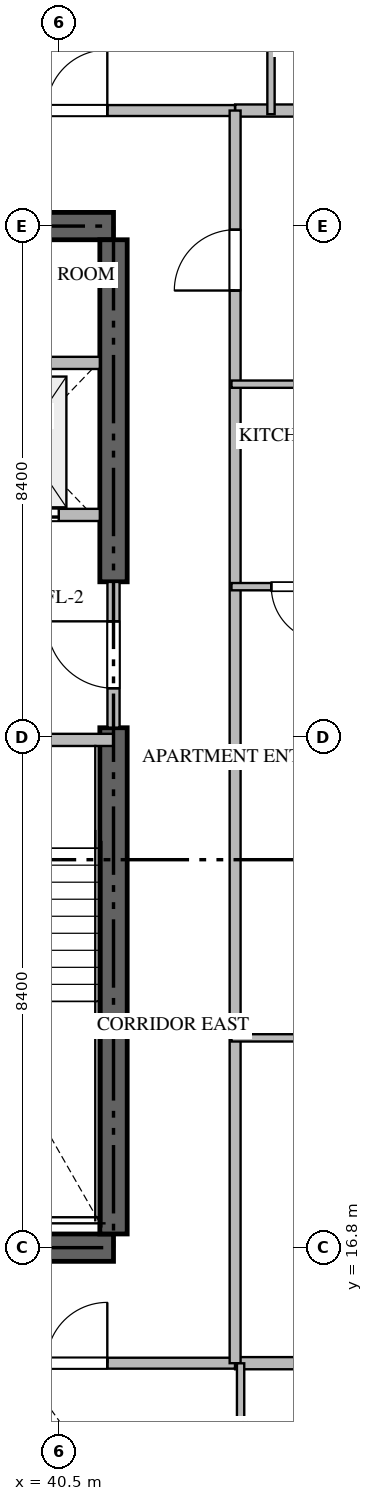
"""IFC4 building model, lengths in metres.
Left out: names, types, materials, properties, quantities, classifications, styles, units other than length and angle.
Written with IfcOpenShell. Run it as: python <this file> out.ifc"""

import sys

from ifc_helpers import new_model, si_unit, direction, frame, frame_2d, origin, place, context, subcontext, project, spatial, rectangle, extrude, source, transform, mapped, element, fill, save


model = new_model("IFC4")
c1 = context("Model", 3, precision=1e-05, world=origin(), true_north=direction((0.0, 1.0)))
c2 = subcontext(c1, "Body", "Model", "MODEL_VIEW")
j1 = project(units=[si_unit("LENGTHUNIT", "METRE"), si_unit("PLANEANGLEUNIT", "RADIAN")], contexts=[c1])
p1 = place(None, origin())
s1 = spatial("IfcSite", under=j1, at=p1, CompositionType="ELEMENT")
p2 = place(p1, origin())
s2 = spatial("IfcBuilding", under=s1, at=p2, CompositionType="ELEMENT")
p3 = place(p2, frame((0.0, 0.0, 45.45)))
s3 = spatial("IfcBuildingStorey", under=s2, at=p3, CompositionType="ELEMENT", Elevation=45.45)
for number, where, z_axis, x_axis in (
    (1, (23.4, 16.8, -0.26), (0.0, 0.0, 1.0), (1.0, 0.0, 0.0)),
    (2, (41.4, 33.6, -0.26), (0.0, 0.0, 1.0), (-1.0, 0.0, 0.0)),
):
    element("IfcWall", number, at=place(p3, frame(where, z_axis=z_axis, x_axis=x_axis)), inside=s3, PredefinedType="SHEAR", context=c2, shape_type="SweptSolid", body=[
        extrude(rectangle(XDim=18.0, YDim=0.45, at=frame_2d((9.0, 0.0))), origin(), (0.0, 0.0, 1.0), 3.748),
    ])
p4 = place(p3, frame((41.4, 17.025, -0.26), z_axis=(0.0, 0.0, 1.0), x_axis=(0.0, 1.0, 0.0)))
e3 = element("IfcWall", 3, at=p4, inside=s3, PredefinedType="SHEAR", context=c2, shape_type="SweptSolid", body=[
    extrude(rectangle(XDim=8.325, YDim=0.45, at=frame_2d((4.163, 0.0))), origin(), (0.0, 0.0, 1.0), 3.748),
])
p5 = place(p3, frame((41.4, 27.75, -0.26), z_axis=(0.0, 0.0, 1.0), x_axis=(0.0, 1.0, 0.0)))
e4 = element("IfcWall", 4, at=p5, inside=s3, PredefinedType="SHEAR", context=c2, shape_type="SweptSolid", body=[
    extrude(rectangle(XDim=5.625, YDim=0.45, at=frame_2d((2.812, 0.0))), origin(), (0.0, 0.0, 1.0), 3.748),
])
p6 = place(p3, frame((36.95, 25.15, 0.0), z_axis=(0.0, 0.0, 1.0), x_axis=(1.0, 0.0, 0.0)))
e5 = element("IfcWall", 5, at=p6, inside=s3, PredefinedType="STANDARD", context=c2, shape_type="SweptSolid", body=[
    extrude(rectangle(XDim=4.45, YDim=0.2, at=frame_2d((2.225, 0.0))), origin(), (0.0, 0.0, 1.0), 3.49),
])
p7 = place(p6, frame((1.65, 0.0, 0.0)))
e6 = element("IfcOpeningElement", 6, at=p7, cuts=e5, PredefinedType="OPENING", context=c2, shape_type="SweptSolid", body=[
    extrude(rectangle(XDim=1.1, YDim=2.15, at=frame_2d((0.55, 1.075))), frame((0.0, 0.11, 0.0), z_axis=(0.0, -1.0, 0.0), x_axis=(1.0, 0.0, 0.0)), (0.0, 0.0, 1.0), 0.22),
])
p8 = place(p3, frame((38.75, 28.85, 0.0), z_axis=(0.0, 0.0, 1.0), x_axis=(1.0, 0.0, 0.0)))
e7 = element("IfcWall", 7, at=p8, inside=s3, PredefinedType="STANDARD", context=c2, shape_type="SweptSolid", body=[
    extrude(rectangle(XDim=2.425, YDim=0.2, at=frame_2d((1.212, 0.0))), origin(), (0.0, 0.0, 1.0), 3.49),
])
p9 = place(p8, frame((0.55, 0.0, 0.0)))
e8 = element("IfcOpeningElement", 8, at=p9, cuts=e7, PredefinedType="OPENING", context=c2, shape_type="SweptSolid", body=[
    extrude(rectangle(XDim=1.2, YDim=2.2, at=frame_2d((0.6, 1.1))), frame((0.0, 0.11, 0.0), z_axis=(0.0, -1.0, 0.0), x_axis=(1.0, 0.0, 0.0)), (0.0, 0.0, 1.0), 0.22),
])
p10 = place(p3, frame((38.75, 31.35, 0.0), z_axis=(0.0, 0.0, 1.0), x_axis=(1.0, 0.0, 0.0)))
e9 = element("IfcWall", 9, at=p10, inside=s3, PredefinedType="STANDARD", context=c2, shape_type="SweptSolid", body=[
    extrude(rectangle(XDim=2.425, YDim=0.2, at=frame_2d((1.212, 0.0))), origin(), (0.0, 0.0, 1.0), 3.49),
])
p11 = place(p3, frame((41.4, 25.352, 0.0), z_axis=(0.0, 0.0, 1.0), x_axis=(0.0, 1.0, 0.0)))
e10 = element("IfcWall", 10, at=p11, inside=s3, PredefinedType="STANDARD", context=c2, shape_type="SweptSolid", body=[
    extrude(rectangle(XDim=2.396, YDim=0.2, at=frame_2d((1.198, 0.0))), origin(), (0.0, 0.0, 1.0), 3.49),
])
p12 = place(p11, frame((0.648, 0.0, 0.0)))
e11 = element("IfcOpeningElement", 11, at=p12, cuts=e10, PredefinedType="OPENING", context=c2, shape_type="SweptSolid", body=[
    extrude(rectangle(XDim=1.1, YDim=2.15, at=frame_2d((0.55, 1.075))), frame((0.0, 0.11, 0.0), z_axis=(0.0, -1.0, 0.0), x_axis=(1.0, 0.0, 0.0)), (0.0, 0.0, 1.0), 0.22),
])
for number, where, z_axis, x_axis in (
    (12, (43.4, 14.9, 0.0), (0.0, 0.0, 1.0), (1.0, 0.0, 0.0)),
    (13, (43.4, 35.5, 0.0), (0.0, 0.0, 1.0), (1.0, 0.0, 0.0)),
):
    element("IfcWall", number, at=place(p3, frame(where, z_axis=z_axis, x_axis=x_axis)), inside=s3, PredefinedType="PARTITIONING", context=c2, shape_type="SweptSolid", body=[
        extrude(rectangle(XDim=15.318, YDim=0.2, at=frame_2d((7.659, 0.0))), origin(), (0.0, 0.0, 1.0), 3.49),
    ])
p13 = place(p3, frame((21.402, 14.9, 0.0), z_axis=(0.0, 0.0, 1.0), x_axis=(1.0, 0.0, 0.0)))
e14 = element("IfcWall", 14, at=p13, inside=s3, PredefinedType="PARTITIONING", context=c2, shape_type="SweptSolid", body=[
    extrude(rectangle(XDim=21.996, YDim=0.18, at=frame_2d((10.998, 0.0))), origin(), (0.0, 0.0, 1.0), 3.49),
])
p14 = place(p13, frame((2.1, 0.0, 0.0)))
e15 = element("IfcOpeningElement", 15, at=p14, cuts=e14, PredefinedType="OPENING", context=c2, shape_type="SweptSolid", body=[
    extrude(rectangle(XDim=1.0, YDim=2.15, at=frame_2d((0.5, 1.075))), frame((0.0, 0.1, 0.0), z_axis=(0.0, -1.0, 0.0), x_axis=(1.0, 0.0, 0.0)), (0.0, 0.0, 1.0), 0.2),
])
p15 = place(p13, frame((14.319, 0.0, 0.0)))
e16 = element("IfcOpeningElement", 16, at=p15, cuts=e14, PredefinedType="OPENING", context=c2, shape_type="SweptSolid", body=[
    extrude(rectangle(XDim=1.0, YDim=2.15, at=frame_2d((0.5, 1.075))), frame((0.0, 0.1, 0.0), z_axis=(0.0, -1.0, 0.0), x_axis=(1.0, 0.0, 0.0)), (0.0, 0.0, 1.0), 0.2),
])
p16 = place(p13, frame((18.896, 0.0, 0.0)))
e17 = element("IfcOpeningElement", 17, at=p16, cuts=e14, PredefinedType="OPENING", context=c2, shape_type="SweptSolid", body=[
    extrude(rectangle(XDim=1.0, YDim=2.15, at=frame_2d((0.5, 1.075))), frame((0.0, 0.1, 0.0), z_axis=(0.0, -1.0, 0.0), x_axis=(1.0, 0.0, 0.0)), (0.0, 0.0, 1.0), 0.2),
])
p17 = place(p3, frame((21.402, 35.5, 0.0), z_axis=(0.0, 0.0, 1.0), x_axis=(1.0, 0.0, 0.0)))
e18 = element("IfcWall", 18, at=p17, inside=s3, PredefinedType="PARTITIONING", context=c2, shape_type="SweptSolid", body=[
    extrude(rectangle(XDim=21.996, YDim=0.18, at=frame_2d((10.998, 0.0))), origin(), (0.0, 0.0, 1.0), 3.49),
])
p18 = place(p17, frame((2.1, 0.0, 0.0)))
e19 = element("IfcOpeningElement", 19, at=p18, cuts=e18, PredefinedType="OPENING", context=c2, shape_type="SweptSolid", body=[
    extrude(rectangle(XDim=1.0, YDim=2.15, at=frame_2d((0.5, 1.075))), frame((0.0, 0.1, 0.0), z_axis=(0.0, -1.0, 0.0), x_axis=(1.0, 0.0, 0.0)), (0.0, 0.0, 1.0), 0.2),
])
p19 = place(p17, frame((5.333, 0.0, 0.0)))
e20 = element("IfcOpeningElement", 20, at=p19, cuts=e18, PredefinedType="OPENING", context=c2, shape_type="SweptSolid", body=[
    extrude(rectangle(XDim=1.0, YDim=2.15, at=frame_2d((0.5, 1.075))), frame((0.0, 0.1, 0.0), z_axis=(0.0, -1.0, 0.0), x_axis=(1.0, 0.0, 0.0)), (0.0, 0.0, 1.0), 0.2),
])
p20 = place(p17, frame((11.842, 0.0, 0.0)))
e21 = element("IfcOpeningElement", 21, at=p20, cuts=e18, PredefinedType="OPENING", context=c2, shape_type="SweptSolid", body=[
    extrude(rectangle(XDim=1.0, YDim=2.15, at=frame_2d((0.5, 1.075))), frame((0.0, 0.1, 0.0), z_axis=(0.0, -1.0, 0.0), x_axis=(1.0, 0.0, 0.0)), (0.0, 0.0, 1.0), 0.2),
])
p21 = place(p17, frame((18.896, 0.0, 0.0)))
e22 = element("IfcOpeningElement", 22, at=p21, cuts=e18, PredefinedType="OPENING", context=c2, shape_type="SweptSolid", body=[
    extrude(rectangle(XDim=1.0, YDim=2.15, at=frame_2d((0.5, 1.075))), frame((0.0, 0.1, 0.0), z_axis=(0.0, -1.0, 0.0), x_axis=(1.0, 0.0, 0.0)), (0.0, 0.0, 1.0), 0.2),
])
p22 = place(p3, frame((43.4, 14.9, 0.0), z_axis=(0.0, 0.0, 1.0), x_axis=(0.0, 1.0, 0.0)))
e23 = element("IfcWall", 23, at=p22, inside=s3, PredefinedType="PARTITIONING", context=c2, shape_type="SweptSolid", body=[
    extrude(rectangle(XDim=20.6, YDim=0.18, at=frame_2d((10.3, 0.0))), origin(), (0.0, 0.0, 1.0), 3.49),
])
p23 = place(p22, frame((17.64, 0.0, 0.0)))
e24 = element("IfcOpeningElement", 24, at=p23, cuts=e23, PredefinedType="OPENING", context=c2, shape_type="SweptSolid", body=[
    extrude(rectangle(XDim=1.0, YDim=2.15, at=frame_2d((0.5, 1.075))), frame((0.0, 0.1, 0.0), z_axis=(0.0, -1.0, 0.0), x_axis=(1.0, 0.0, 0.0)), (0.0, 0.0, 1.0), 0.2),
])
p24 = place(p3, frame((43.49, 12.15, 0.0), z_axis=(0.0, 0.0, 1.0), x_axis=(0.0, 1.0, 0.0)))
e25 = element("IfcWall", 25, at=p24, inside=s3, PredefinedType="PARTITIONING", context=c2, shape_type="SweptSolid", body=[
    extrude(rectangle(XDim=2.748, YDim=0.12, at=frame_2d((1.374, 0.0))), origin(), (0.0, 0.0, 1.0), 3.49),
])
p25 = place(p3, frame((43.99, 38.25, 0.0), z_axis=(0.0, 0.0, 1.0), x_axis=(0.0, -1.0, 0.0)))
e26 = element("IfcWall", 26, at=p25, inside=s3, PredefinedType="PARTITIONING", context=c2, shape_type="SweptSolid", body=[
    extrude(rectangle(XDim=2.81, YDim=0.12, at=frame_2d((1.405, 0.0))), origin(), (0.0, 0.0, 1.0), 3.49),
])
p26 = place(p3, frame((46.15, 31.0, 0.0), z_axis=(0.0, 0.0, 1.0), x_axis=(-1.0, 0.0, 0.0)))
e27 = element("IfcWall", 27, at=p26, inside=s3, PredefinedType="PARTITIONING", context=c2, shape_type="SweptSolid", body=[
    extrude(rectangle(XDim=2.81, YDim=0.12, at=frame_2d((1.405, 0.0))), origin(), (0.0, 0.0, 1.0), 3.49),
])
p27 = place(p3, frame((45.55, 27.67, 0.0), z_axis=(0.0, 0.0, 1.0), x_axis=(-1.0, 0.0, 0.0)))
e28 = element("IfcWall", 28, at=p27, inside=s3, PredefinedType="PARTITIONING", context=c2, shape_type="SweptSolid", body=[
    extrude(rectangle(XDim=2.21, YDim=0.12, at=frame_2d((1.105, 0.0))), origin(), (0.0, 0.0, 1.0), 3.49),
])
p28 = place(p27, frame((0.655, 0.0, 0.0)))
e29 = element("IfcOpeningElement", 29, at=p28, cuts=e28, PredefinedType="OPENING", context=c2, shape_type="SweptSolid", body=[
    extrude(rectangle(XDim=0.9, YDim=2.1, at=frame_2d((0.45, 1.05))), frame((0.0, 0.07, 0.0), z_axis=(0.0, -1.0, 0.0), x_axis=(1.0, 0.0, 0.0)), (0.0, 0.0, 1.0), 0.14),
])
p29 = place(p3, frame((45.548, 20.25, 0.0), z_axis=(0.0, 0.0, 1.0), x_axis=(-1.0, 0.0, 0.0)))
e30 = element("IfcWall", 30, at=p29, inside=s3, PredefinedType="PARTITIONING", context=c2, shape_type="SweptSolid", body=[
    extrude(rectangle(XDim=2.208, YDim=0.12, at=frame_2d((1.104, 0.0))), origin(), (0.0, 0.0, 1.0), 3.49),
])
m1 = source(origin(), c2, "Body", "SweptSolid", [
    extrude(rectangle(XDim=1.2, YDim=2.2, at=frame_2d((0.6, 1.1))), frame((0.0, 0.025, 0.0), z_axis=(0.0, -1.0, 0.0), x_axis=(1.0, 0.0, 0.0)), (0.0, 0.0, 1.0), 0.05),
])
p30 = place(p9, origin())
e31 = element("IfcDoor", 31, at=p30, inside=s3, OperationType="DOUBLE_DOOR_SLIDING", PredefinedType="DOOR", context=c2, shape_type="MappedRepresentation", body=[
    mapped(m1, transform((0.0, 0.0, 0.0), scale=1.0)),
])
fill(e8, e31)
m2 = source(origin(), c2, "Body", "SweptSolid", [
    extrude(rectangle(XDim=1.1, YDim=2.15, at=frame_2d((0.55, 1.075))), frame((0.0, 0.025, 0.0), z_axis=(0.0, -1.0, 0.0), x_axis=(1.0, 0.0, 0.0)), (0.0, 0.0, 1.0), 0.05),
])
p31 = place(p12, origin())
e32 = element("IfcDoor", 32, at=p31, inside=s3, OperationType="SINGLE_SWING_RIGHT", PredefinedType="DOOR", context=c2, shape_type="MappedRepresentation", body=[
    mapped(m2, transform((0.0, 0.0, 0.0), scale=1.0)),
])
fill(e11, e32)
m3 = source(origin(), c2, "Body", "SweptSolid", [
    extrude(rectangle(XDim=1.0, YDim=2.15, at=frame_2d((0.5, 1.075))), frame((0.0, 0.025, 0.0), z_axis=(0.0, -1.0, 0.0), x_axis=(1.0, 0.0, 0.0)), (0.0, 0.0, 1.0), 0.05),
])
p32 = place(p16, origin())
e33 = element("IfcDoor", 33, at=p32, inside=s3, OperationType="SINGLE_SWING_RIGHT", PredefinedType="DOOR", context=c2, shape_type="MappedRepresentation", body=[
    mapped(m3, transform((0.0, 0.0, 0.0), scale=1.0)),
])
fill(e17, e33)
p33 = place(p21, origin())
e34 = element("IfcDoor", 34, at=p33, inside=s3, OperationType="SINGLE_SWING_RIGHT", PredefinedType="DOOR", context=c2, shape_type="MappedRepresentation", body=[
    mapped(m3, transform((0.0, 0.0, 0.0), scale=1.0)),
])
fill(e22, e34)
p34 = place(p23, origin())
e35 = element("IfcDoor", 35, at=p34, inside=s3, OperationType="SINGLE_SWING_LEFT", PredefinedType="DOOR", context=c2, shape_type="MappedRepresentation", body=[
    mapped(m3, transform((0.0, 0.0, 0.0), scale=1.0)),
])
fill(e24, e35)
m4 = source(origin(), c2, "Body", "SweptSolid", [
    extrude(rectangle(XDim=0.9, YDim=2.1, at=frame_2d((0.45, 1.05))), frame((0.0, 0.025, 0.0), z_axis=(0.0, -1.0, 0.0), x_axis=(1.0, 0.0, 0.0)), (0.0, 0.0, 1.0), 0.05),
])
p35 = place(p28, origin())
e36 = element("IfcDoor", 36, at=p35, inside=s3, OperationType="SINGLE_SWING_LEFT", PredefinedType="DOOR", context=c2, shape_type="MappedRepresentation", body=[
    mapped(m4, transform((0.0, 0.0, 0.0), scale=1.0)),
])
fill(e29, e36)
save(model, sys.argv[1])
